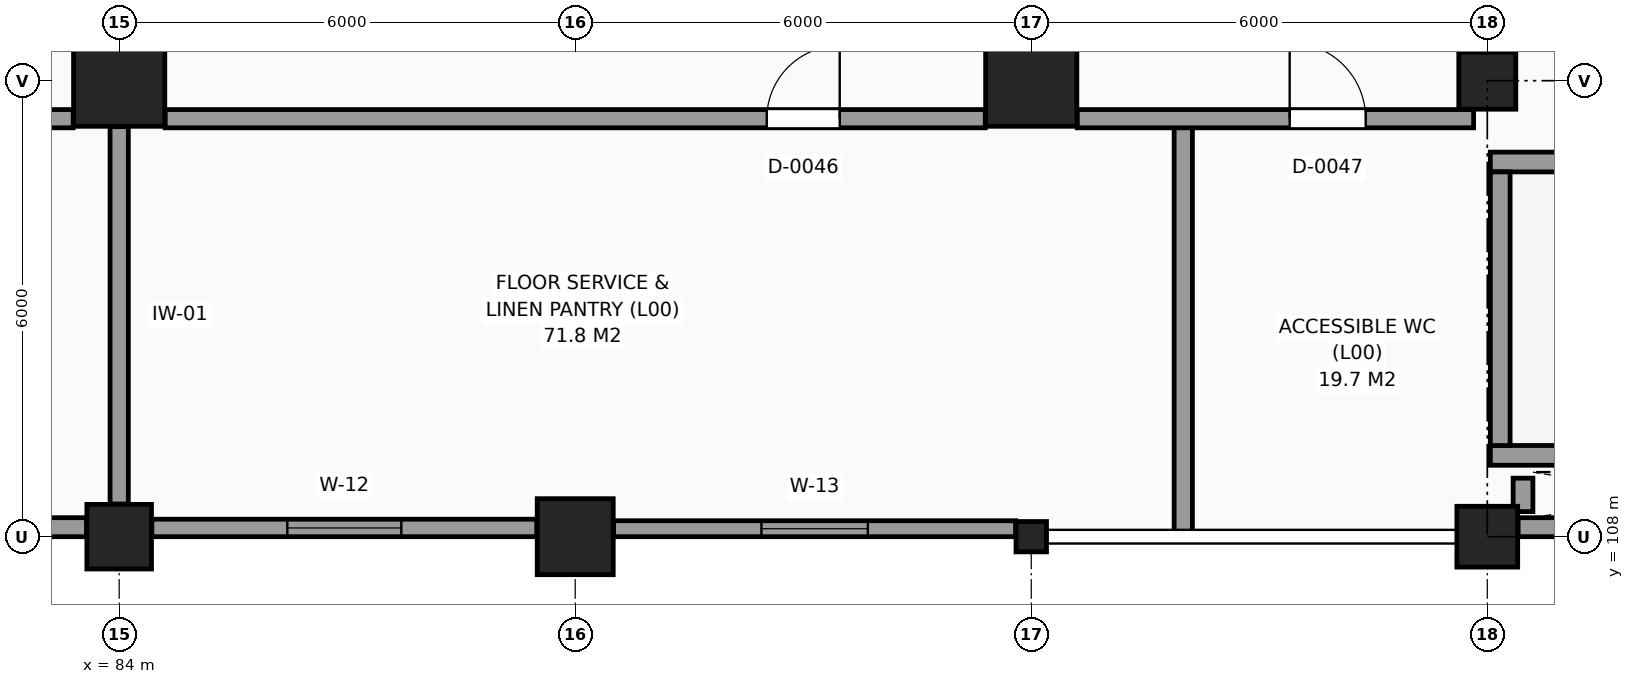
"""IFC4 building model, lengths in metres.
Left out: names, types, materials, properties, quantities, classifications, styles, units other than length and angle.
Written with IfcOpenShell. Run it as: python <this file> out.ifc"""

import sys

from ifc_helpers import new_model, si_unit, direction, frame, frame_2d, origin, origin_2d, place, context, subcontext, project, spatial, rectangle, circle, i_section, extrude, element, fill, save


model = new_model("IFC4")
c1 = context("Model", 3, precision=1e-05, world=origin(), true_north=direction((0.0, 1.0)))
c2 = subcontext(c1, "Body", "Model", "MODEL_VIEW")
j1 = project(units=[si_unit("LENGTHUNIT", "METRE"), si_unit("PLANEANGLEUNIT", "RADIAN")], contexts=[c1])
p1 = place(None, origin())
s1 = spatial("IfcSite", under=j1, at=p1, CompositionType="ELEMENT")
p2 = place(p1, origin())
s2 = spatial("IfcBuilding", under=s1, at=p2, CompositionType="ELEMENT")
p3 = place(p2, origin())
s3 = spatial("IfcBuildingStorey", under=s2, at=p3, CompositionType="ELEMENT", Elevation=0.0)
p4 = place(p3, frame((84.0, 108.0, 0.0), z_axis=(0.0, 0.0, 1.0), x_axis=(1.0, 0.0, 0.0)))
e1 = element("IfcColumn", 1, at=p4, inside=s3, PredefinedType="COLUMN", context=c2, shape_type="SweptSolid", body=[
    extrude(circle(Radius=0.425, at=origin_2d()), origin(), (0.0, 0.0, 1.0), 6.0),
])
p5 = place(p3, frame((84.0, 114.0, 0.0), z_axis=(0.0, 0.0, 1.0), x_axis=(1.0, 0.0, 0.0)))
e2 = element("IfcColumn", 2, at=p5, inside=s3, PredefinedType="COLUMN", context=c2, shape_type="SweptSolid", body=[
    extrude(rectangle(XDim=1.2, YDim=1.2, at=origin_2d()), origin(), (0.0, 0.0, 1.0), 6.0),
])
p6 = place(p3, frame((90.0, 108.0, 0.0), z_axis=(0.0, 0.0, 1.0), x_axis=(1.0, 0.0, 0.0)))
e3 = element("IfcColumn", 3, at=p6, inside=s3, PredefinedType="COLUMN", context=c2, shape_type="SweptSolid", body=[
    extrude(circle(Radius=0.5, at=origin_2d()), origin(), (0.0, 0.0, 1.0), 6.0),
])
p7 = place(p3, frame((96.0, 108.0, 0.0), z_axis=(0.0, 0.0, 1.0), x_axis=(1.0, 0.0, 0.0)))
e4 = element("IfcColumn", 4, at=p7, inside=s3, PredefinedType="COLUMN", context=c2, shape_type="SweptSolid", body=[
    extrude(i_section(OverallWidth=0.401, OverallDepth=0.399, WebThickness=0.019, FlangeThickness=0.03, FilletRadius=0.015, at=origin_2d()), origin(), (0.0, 0.0, 1.0), 6.0),
])
p8 = place(p3, frame((96.0, 114.0, 0.0), z_axis=(0.0, 0.0, 1.0), x_axis=(1.0, 0.0, 0.0)))
e5 = element("IfcColumn", 5, at=p8, inside=s3, PredefinedType="COLUMN", context=c2, shape_type="SweptSolid", body=[
    extrude(rectangle(XDim=1.2, YDim=1.2, at=origin_2d()), origin(), (0.0, 0.0, 1.0), 6.0),
])
p9 = place(p3, frame((102.0, 108.0, 0.0), z_axis=(0.0, 0.0, 1.0), x_axis=(1.0, 0.0, 0.0)))
e6 = element("IfcColumn", 6, at=p9, inside=s3, PredefinedType="COLUMN", context=c2, shape_type="SweptSolid", body=[
    extrude(rectangle(XDim=0.8, YDim=0.8, at=origin_2d()), origin(), (0.0, 0.0, 1.0), 6.0),
])
p10 = place(p3, frame((102.0, 114.0, 0.0), z_axis=(0.0, 0.0, 1.0), x_axis=(1.0, 0.0, 0.0)))
e7 = element("IfcColumn", 7, at=p10, inside=s3, PredefinedType="COLUMN", context=c2, shape_type="SweptSolid", body=[
    extrude(rectangle(XDim=0.75, YDim=0.75, at=origin_2d()), origin(), (0.0, 0.0, 1.0), 6.0),
])
p11 = place(p3, frame((78.38, 108.125, 0.0), z_axis=(0.0, 0.0, 1.0), x_axis=(1.0, 0.0, 0.0)))
e8 = element("IfcWall", 8, at=p11, inside=s3, PredefinedType="SOLIDWALL", context=c2, shape_type="SweptSolid", body=[
    extrude(rectangle(XDim=5.19, YDim=0.25, at=frame_2d((2.595, 0.0))), origin(), (0.0, 0.0, 1.0), 4.99),
])
p12 = place(p3, frame((84.43, 108.115, 0.0), z_axis=(0.0, 0.0, 1.0), x_axis=(1.0, 0.0, 0.0)))
e9 = element("IfcWall", 9, at=p12, inside=s3, PredefinedType="SOLIDWALL", context=c2, shape_type="SweptSolid", body=[
    extrude(rectangle(XDim=5.065, YDim=0.23, at=frame_2d((2.533, 0.0))), origin(), (0.0, 0.0, 1.0), 4.99),
])
p13 = place(p12, frame((1.782, 0.0, 0.85)))
e10 = element("IfcOpeningElement", 10, at=p13, cuts=e9, PredefinedType="OPENING", context=c2, shape_type="SweptSolid", body=[
    extrude(rectangle(XDim=1.5, YDim=1.5, at=frame_2d((0.75, 0.75))), frame((0.0, 0.125, 0.0), z_axis=(0.0, -1.0, 0.0), x_axis=(1.0, 0.0, 0.0)), (0.0, 0.0, 1.0), 0.25),
])
p14 = place(p3, frame((90.505, 108.105, 0.0), z_axis=(0.0, 0.0, 1.0), x_axis=(1.0, 0.0, 0.0)))
e11 = element("IfcWall", 11, at=p14, inside=s3, PredefinedType="SOLIDWALL", context=c2, shape_type="SweptSolid", body=[
    extrude(rectangle(XDim=5.29, YDim=0.21, at=frame_2d((2.645, 0.0))), origin(), (0.0, 0.0, 1.0), 4.99),
])
p15 = place(p14, frame((1.945, 0.0, 0.85)))
e12 = element("IfcOpeningElement", 12, at=p15, cuts=e11, PredefinedType="OPENING", context=c2, shape_type="SweptSolid", body=[
    extrude(rectangle(XDim=1.4, YDim=1.4, at=frame_2d((0.7, 0.7))), frame((0.0, 0.115, 0.0), z_axis=(0.0, -1.0, 0.0), x_axis=(1.0, 0.0, 0.0)), (0.0, 0.0, 1.0), 0.23),
])
p16 = place(p3, frame((102.405, 108.125, 0.0), z_axis=(0.0, 0.0, 1.0), x_axis=(1.0, 0.0, 0.0)))
e13 = element("IfcWall", 13, at=p16, inside=s3, PredefinedType="SOLIDWALL", context=c2, shape_type="SweptSolid", body=[
    extrude(rectangle(XDim=5.215, YDim=0.25, at=frame_2d((2.607, 0.0))), origin(), (0.0, 0.0, 1.0), 5.74),
])
for number, where, z_axis, x_axis in (
    (14, (102.04, 109.07, 0.0), (0.0, 0.0, 1.0), (1.0, 0.0, 0.0)),
    (15, (102.04, 112.93, 0.0), (0.0, 0.0, 1.0), (1.0, 0.0, 0.0)),
):
    element("IfcWall", number, at=place(p3, frame(where, z_axis=z_axis, x_axis=x_axis)), inside=s3, PredefinedType="SHEAR", context=c2, shape_type="SweptSolid", body=[
        extrude(rectangle(XDim=10.72, YDim=0.26, at=frame_2d((5.36, 0.0))), origin(), (0.0, 0.0, 1.0), 6.0),
    ])
p17 = place(p3, frame((102.17, 109.2, 0.0), z_axis=(0.0, 0.0, 1.0), x_axis=(0.0, 1.0, 0.0)))
e16 = element("IfcWall", 16, at=p17, inside=s3, PredefinedType="SHEAR", context=c2, shape_type="SweptSolid", body=[
    extrude(rectangle(XDim=3.6, YDim=0.26, at=frame_2d((1.8, 0.0))), origin(), (0.0, 0.0, 1.0), 6.0),
])
p18 = place(p3, frame((102.47, 108.33, 0.0), z_axis=(0.0, 0.0, 1.0), x_axis=(0.0, 1.0, 0.0)))
e17 = element("IfcWall", 17, at=p18, inside=s3, PredefinedType="SHEAR", context=c2, shape_type="SweptSolid", body=[
    extrude(rectangle(XDim=0.44, YDim=0.26, at=frame_2d((0.22, 0.0))), origin(), (0.0, 0.0, 1.0), 6.0),
])
p19 = place(p3, frame((84.0, 108.43, 0.0), z_axis=(0.0, 0.0, 1.0), x_axis=(0.0, 1.0, 0.0)))
e18 = element("IfcWall", 18, at=p19, inside=s3, PredefinedType="PARTITIONING", context=c2, shape_type="SweptSolid", body=[
    extrude(rectangle(XDim=4.965, YDim=0.24, at=frame_2d((2.482, 0.0))), origin(), (0.0, 0.0, 1.0), 5.4),
])
p20 = place(p3, frame((98.0, 108.045, 0.0), z_axis=(0.0, 0.0, 1.0), x_axis=(0.0, 1.0, 0.0)))
e19 = element("IfcWall", 19, at=p20, inside=s3, PredefinedType="PARTITIONING", context=c2, shape_type="SweptSolid", body=[
    extrude(rectangle(XDim=5.455, YDim=0.24, at=frame_2d((2.728, 0.0))), origin(), (0.0, 0.0, 1.0), 5.74),
])
p21 = place(p3, frame((72.605, 113.5, 0.0), z_axis=(0.0, 0.0, 1.0), x_axis=(1.0, 0.0, 0.0)))
e20 = element("IfcWall", 20, at=p21, inside=s3, PredefinedType="PARTITIONING", context=c2, shape_type="SweptSolid", body=[
    extrude(rectangle(XDim=10.79, YDim=0.24, at=frame_2d((5.395, 0.0))), origin(), (0.0, 0.0, 1.0), 5.74),
])
p22 = place(p3, frame((84.605, 113.5, 0.0), z_axis=(0.0, 0.0, 1.0), x_axis=(1.0, 0.0, 0.0)))
e21 = element("IfcWall", 21, at=p22, inside=s3, PredefinedType="PARTITIONING", context=c2, shape_type="SweptSolid", body=[
    extrude(rectangle(XDim=10.79, YDim=0.24, at=frame_2d((5.395, 0.0))), origin(), (0.0, 0.0, 1.0), 5.74),
])
p23 = place(p22, frame((7.915, 0.0, 0.0)))
e22 = element("IfcOpeningElement", 22, at=p23, cuts=e21, PredefinedType="OPENING", context=c2, shape_type="SweptSolid", body=[
    extrude(rectangle(XDim=0.96, YDim=2.15, at=frame_2d((0.48, 1.075))), frame((0.0, 0.13, 0.0), z_axis=(0.0, -1.0, 0.0), x_axis=(1.0, 0.0, 0.0)), (0.0, 0.0, 1.0), 0.26),
])
p24 = place(p3, frame((96.605, 113.5, 0.0), z_axis=(0.0, 0.0, 1.0), x_axis=(1.0, 0.0, 0.0)))
e23 = element("IfcWall", 23, at=p24, inside=s3, PredefinedType="PARTITIONING", context=c2, shape_type="SweptSolid", body=[
    extrude(rectangle(XDim=5.215, YDim=0.24, at=frame_2d((2.607, 0.0))), origin(), (0.0, 0.0, 1.0), 5.74),
])
p25 = place(p24, frame((2.795, 0.0, 0.0)))
e24 = element("IfcOpeningElement", 24, at=p25, cuts=e23, PredefinedType="OPENING", context=c2, shape_type="SweptSolid", body=[
    extrude(rectangle(XDim=1.0, YDim=2.15, at=frame_2d((0.5, 1.075))), frame((0.0, 0.13, 0.0), z_axis=(0.0, -1.0, 0.0), x_axis=(1.0, 0.0, 0.0)), (0.0, 0.0, 1.0), 0.26),
])
p26 = place(p13, origin())
e25 = element("IfcWindow", 25, at=p26, inside=s3, PartitioningType="SINGLE_PANEL", PredefinedType="WINDOW", context=c2, shape_type="SweptSolid", body=[
    extrude(rectangle(XDim=1.5, YDim=1.5, at=frame_2d((0.75, 0.75))), frame((0.0, 0.03, 0.0), z_axis=(0.0, -1.0, 0.0), x_axis=(1.0, 0.0, 0.0)), (0.0, 0.0, 1.0), 0.06),
])
fill(e10, e25)
p27 = place(p15, origin())
e26 = element("IfcWindow", 26, at=p27, inside=s3, PartitioningType="SINGLE_PANEL", PredefinedType="WINDOW", context=c2, shape_type="SweptSolid", body=[
    extrude(rectangle(XDim=1.4, YDim=1.4, at=frame_2d((0.7, 0.7))), frame((0.0, 0.03, 0.0), z_axis=(0.0, -1.0, 0.0), x_axis=(1.0, 0.0, 0.0)), (0.0, 0.0, 1.0), 0.06),
])
fill(e12, e26)
p28 = place(p23, origin())
e27 = element("IfcDoor", 27, at=p28, inside=s3, OperationType="SINGLE_SWING_RIGHT", PredefinedType="DOOR", context=c2, shape_type="SweptSolid", body=[
    extrude(rectangle(XDim=0.96, YDim=2.15, at=frame_2d((0.48, 1.075))), frame((0.0, 0.025, 0.0), z_axis=(0.0, -1.0, 0.0), x_axis=(1.0, 0.0, 0.0)), (0.0, 0.0, 1.0), 0.05),
])
fill(e22, e27)
p29 = place(p25, origin())
e28 = element("IfcDoor", 28, at=p29, inside=s3, OperationType="SINGLE_SWING_LEFT", PredefinedType="DOOR", context=c2, shape_type="SweptSolid", body=[
    extrude(rectangle(XDim=1.0, YDim=2.15, at=frame_2d((0.5, 1.075))), frame((0.0, 0.025, 0.0), z_axis=(0.0, -1.0, 0.0), x_axis=(1.0, 0.0, 0.0)), (0.0, 0.0, 1.0), 0.05),
])
fill(e24, e28)
save(model, sys.argv[1])
